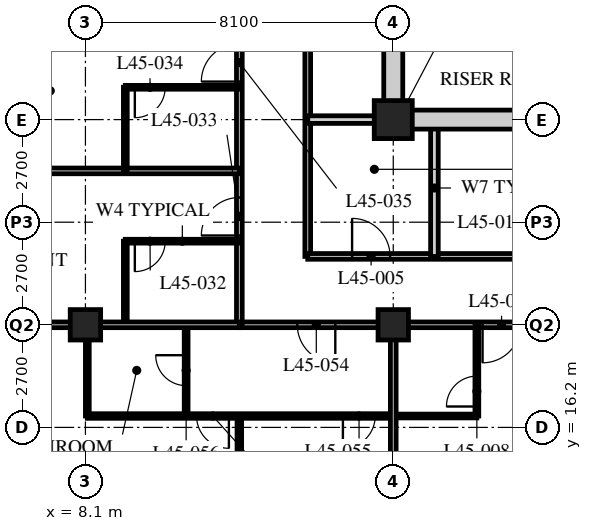
"""IFC4 building model, lengths in metres.
Left out: names, types, materials, properties, quantities, classifications, styles, units other than length and angle.
Written with IfcOpenShell. Run it as: python <this file> out.ifc"""

import sys

from ifc_helpers import new_model, si_unit, direction, frame, frame_2d, origin, origin_2d, place, context, subcontext, project, spatial, rectangle, hollow_rectangle, extrude, element, fill, save


model = new_model("IFC4")
c1 = context("Model", 3, precision=1e-05, world=origin(), true_north=direction((0.0, 1.0)))
c2 = subcontext(c1, "Body", "Model", "MODEL_VIEW")
j1 = project(units=[si_unit("LENGTHUNIT", "METRE"), si_unit("PLANEANGLEUNIT", "RADIAN")], contexts=[c1])
p1 = place(None, origin())
s1 = spatial("IfcSite", under=j1, at=p1, CompositionType="ELEMENT")
p2 = place(p1, origin())
s2 = spatial("IfcBuilding", under=s1, at=p2, CompositionType="ELEMENT")
p3 = place(p2, frame((0.0, 0.0, 177.6)))
s3 = spatial("IfcBuildingStorey", under=s2, at=p3, CompositionType="ELEMENT", Elevation=177.6)
for number, where, z_axis, x_axis in (
    (1, (8.1, 18.9, 0.0), (0.0, 0.0, 1.0), (1.0, 0.0, 0.0)),
    (2, (16.2, 18.9, 0.0), (0.0, 0.0, 1.0), (1.0, 0.0, 0.0)),
):
    element("IfcColumn", number, at=place(p3, frame(where, z_axis=z_axis, x_axis=x_axis)), inside=s3, PredefinedType="COLUMN", context=c2, shape_type="SweptSolid", body=[
        extrude(hollow_rectangle(XDim=0.8, YDim=0.8, WallThickness=0.08, at=origin_2d()), origin(), (0.0, 0.0, 1.0), 3.6),
    ])
p4 = place(p3, frame((16.2, 24.3, 0.0), z_axis=(0.0, 0.0, 1.0), x_axis=(1.0, 0.0, 0.0)))
e3 = element("IfcColumn", 3, at=p4, inside=s3, PredefinedType="COLUMN", context=c2, shape_type="SweptSolid", body=[
    extrude(hollow_rectangle(XDim=1.0, YDim=1.0, WallThickness=0.1, at=origin_2d()), origin(), (0.0, 0.0, 1.0), 3.6),
])
p5 = place(p3, frame((12.15, 18.9, 0.0), z_axis=(0.0, 0.0, 1.0), x_axis=(1.0, 0.0, 0.0)))
e4 = element("IfcWall", 4, at=p5, inside=s3, PredefinedType="PARTITIONING", context=c2, shape_type="SweptSolid", body=[
    extrude(rectangle(XDim=32.4, YDim=0.15, at=frame_2d((16.2, 0.0))), origin(), (0.0, 0.0, 1.0), 2.778),
])
p6 = place(p5, frame((6.4, 0.0, 0.0)))
e5 = element("IfcOpeningElement", 5, at=p6, cuts=e4, PredefinedType="OPENING", context=c2, shape_type="SweptSolid", body=[
    extrude(rectangle(XDim=1.0, YDim=2.1, at=frame_2d((0.5, 1.05))), frame((0.0, 0.085, 0.0), z_axis=(0.0, -1.0, 0.0), x_axis=(1.0, 0.0, 0.0)), (0.0, 0.0, 1.0), 0.17),
])
p7 = place(p5, frame((8.8, 0.0, 0.0)))
e6 = element("IfcOpeningElement", 6, at=p7, cuts=e4, PredefinedType="OPENING", context=c2, shape_type="SweptSolid", body=[
    extrude(rectangle(XDim=1.0, YDim=2.1, at=frame_2d((0.5, 1.05))), frame((0.0, 0.085, 0.0), z_axis=(0.0, -1.0, 0.0), x_axis=(1.0, 0.0, 0.0)), (0.0, 0.0, 1.0), 0.17),
])
p8 = place(p5, frame((13.05, 0.0, 0.0)))
e7 = element("IfcOpeningElement", 7, at=p8, cuts=e4, PredefinedType="OPENING", context=c2, shape_type="SweptSolid", body=[
    extrude(rectangle(XDim=1.0, YDim=2.1, at=frame_2d((0.5, 1.05))), frame((0.0, 0.085, 0.0), z_axis=(0.0, -1.0, 0.0), x_axis=(1.0, 0.0, 0.0)), (0.0, 0.0, 1.0), 0.17),
])
p9 = place(p5, frame((22.6, 0.0, 0.0)))
e8 = element("IfcOpeningElement", 8, at=p9, cuts=e4, PredefinedType="OPENING", context=c2, shape_type="SweptSolid", body=[
    extrude(rectangle(XDim=1.0, YDim=2.1, at=frame_2d((0.5, 1.05))), frame((0.0, 0.085, 0.0), z_axis=(0.0, -1.0, 0.0), x_axis=(1.0, 0.0, 0.0)), (0.0, 0.0, 1.0), 0.17),
])
p10 = place(p5, frame((25.0, 0.0, 0.0)))
e9 = element("IfcOpeningElement", 9, at=p10, cuts=e4, PredefinedType="OPENING", context=c2, shape_type="SweptSolid", body=[
    extrude(rectangle(XDim=1.0, YDim=2.1, at=frame_2d((0.5, 1.05))), frame((0.0, 0.085, 0.0), z_axis=(0.0, -1.0, 0.0), x_axis=(1.0, 0.0, 0.0)), (0.0, 0.0, 1.0), 0.17),
])
p11 = place(p5, frame((1.525, 0.0, 0.0)))
e10 = element("IfcOpeningElement", 10, at=p11, cuts=e4, PredefinedType="OPENING", context=c2, shape_type="SweptSolid", body=[
    extrude(rectangle(XDim=1.0, YDim=2.1, at=frame_2d((0.5, 1.05))), frame((0.0, 0.085, 0.0), z_axis=(0.0, -1.0, 0.0), x_axis=(1.0, 0.0, 0.0)), (0.0, 0.0, 1.0), 0.17),
])
p12 = place(p5, frame((29.875, 0.0, 0.0)))
e11 = element("IfcOpeningElement", 11, at=p12, cuts=e4, PredefinedType="OPENING", context=c2, shape_type="SweptSolid", body=[
    extrude(rectangle(XDim=1.0, YDim=2.1, at=frame_2d((0.5, 1.05))), frame((0.0, 0.085, 0.0), z_axis=(0.0, -1.0, 0.0), x_axis=(1.0, 0.0, 0.0)), (0.0, 0.0, 1.0), 0.17),
])
p13 = place(p3, frame((12.15, 18.9, 0.0), z_axis=(0.0, 0.0, 1.0), x_axis=(0.0, 1.0, 0.0)))
e12 = element("IfcWall", 12, at=p13, inside=s3, PredefinedType="PARTITIONING", context=c2, shape_type="SweptSolid", body=[
    extrude(rectangle(XDim=24.3, YDim=0.15, at=frame_2d((12.15, 0.0))), origin(), (0.0, 0.0, 1.0), 3.39),
])
p14 = place(p13, frame((2.35, 0.0, 0.0)))
e13 = element("IfcOpeningElement", 13, at=p14, cuts=e12, PredefinedType="OPENING", context=c2, shape_type="SweptSolid", body=[
    extrude(rectangle(XDim=1.0, YDim=2.1, at=frame_2d((0.5, 1.05))), frame((0.0, 0.085, 0.0), z_axis=(0.0, -1.0, 0.0), x_axis=(1.0, 0.0, 0.0)), (0.0, 0.0, 1.0), 0.17),
])
p15 = place(p13, frame((6.4, 0.0, 0.0)))
e14 = element("IfcOpeningElement", 14, at=p15, cuts=e12, PredefinedType="OPENING", context=c2, shape_type="SweptSolid", body=[
    extrude(rectangle(XDim=1.0, YDim=2.1, at=frame_2d((0.5, 1.05))), frame((0.0, 0.085, 0.0), z_axis=(0.0, -1.0, 0.0), x_axis=(1.0, 0.0, 0.0)), (0.0, 0.0, 1.0), 0.17),
])
p16 = place(p13, frame((8.5, 0.0, 0.0)))
e15 = element("IfcOpeningElement", 15, at=p16, cuts=e12, PredefinedType="OPENING", context=c2, shape_type="SweptSolid", body=[
    extrude(rectangle(XDim=1.0, YDim=2.1, at=frame_2d((0.5, 1.05))), frame((0.0, 0.085, 0.0), z_axis=(0.0, -1.0, 0.0), x_axis=(1.0, 0.0, 0.0)), (0.0, 0.0, 1.0), 0.17),
])
p17 = place(p13, frame((16.6, 0.0, 0.0)))
e16 = element("IfcOpeningElement", 16, at=p17, cuts=e12, PredefinedType="OPENING", context=c2, shape_type="SweptSolid", body=[
    extrude(rectangle(XDim=1.0, YDim=2.1, at=frame_2d((0.5, 1.05))), frame((0.0, 0.085, 0.0), z_axis=(0.0, -1.0, 0.0), x_axis=(1.0, 0.0, 0.0)), (0.0, 0.0, 1.0), 0.17),
])
p18 = place(p3, frame((13.95, 40.5, 0.0), z_axis=(0.0, 0.0, 1.0), x_axis=(0.0, -1.0, 0.0)))
e17 = element("IfcWall", 17, at=p18, inside=s3, PredefinedType="PARTITIONING", context=c2, shape_type="SweptSolid", body=[
    extrude(rectangle(XDim=19.8, YDim=0.15, at=frame_2d((9.9, 0.0))), origin(), (0.0, 0.0, 1.0), 3.39),
])
p19 = place(p18, frame((11.65, 0.0, 0.0)))
e18 = element("IfcOpeningElement", 18, at=p19, cuts=e17, PredefinedType="OPENING", context=c2, shape_type="SweptSolid", body=[
    extrude(rectangle(XDim=1.0, YDim=2.1, at=frame_2d((0.5, 1.05))), frame((0.0, 0.085, 0.0), z_axis=(0.0, -1.0, 0.0), x_axis=(1.0, 0.0, 0.0)), (0.0, 0.0, 1.0), 0.17),
])
p20 = place(p18, frame((3.55, 0.0, 0.0)))
e19 = element("IfcOpeningElement", 19, at=p20, cuts=e17, PredefinedType="OPENING", context=c2, shape_type="SweptSolid", body=[
    extrude(rectangle(XDim=1.0, YDim=2.1, at=frame_2d((0.5, 1.05))), frame((0.0, 0.085, 0.0), z_axis=(0.0, -1.0, 0.0), x_axis=(1.0, 0.0, 0.0)), (0.0, 0.0, 1.0), 0.17),
])
p21 = place(p3, frame((13.95, 20.7, 0.0), z_axis=(0.0, 0.0, 1.0), x_axis=(1.0, 0.0, 0.0)))
e20 = element("IfcWall", 20, at=p21, inside=s3, PredefinedType="PARTITIONING", context=c2, shape_type="SweptSolid", body=[
    extrude(rectangle(XDim=13.19, YDim=0.15, at=frame_2d((6.595, 0.0))), origin(), (0.0, 0.0, 1.0), 3.39),
])
p22 = place(p21, frame((1.167, 0.0, 0.0)))
e21 = element("IfcOpeningElement", 21, at=p22, cuts=e20, PredefinedType="OPENING", context=c2, shape_type="SweptSolid", body=[
    extrude(rectangle(XDim=1.0, YDim=2.1, at=frame_2d((0.5, 1.05))), frame((0.0, 0.085, 0.0), z_axis=(0.0, -1.0, 0.0), x_axis=(1.0, 0.0, 0.0)), (0.0, 0.0, 1.0), 0.17),
])
p23 = place(p21, frame((7.767, 0.0, 0.0)))
e22 = element("IfcOpeningElement", 22, at=p23, cuts=e20, PredefinedType="OPENING", context=c2, shape_type="SweptSolid", body=[
    extrude(rectangle(XDim=1.0, YDim=2.1, at=frame_2d((0.5, 1.05))), frame((0.0, 0.085, 0.0), z_axis=(0.0, -1.0, 0.0), x_axis=(1.0, 0.0, 0.0)), (0.0, 0.0, 1.0), 0.17),
])
p24 = place(p3, frame((17.283, 20.7, 0.0), z_axis=(0.0, 0.0, 1.0), x_axis=(0.0, 1.0, 0.0)))
e23 = element("IfcWall", 23, at=p24, inside=s3, PredefinedType="SOLIDWALL", context=c2, shape_type="SweptSolid", body=[
    extrude(rectangle(XDim=3.6, YDim=0.2, at=frame_2d((1.8, 0.0))), origin(), (0.0, 0.0, 1.0), 3.39),
])
p25 = place(p3, frame((13.95, 24.3, 0.0), z_axis=(0.0, 0.0, 1.0), x_axis=(1.0, 0.0, 0.0)))
e24 = element("IfcWall", 24, at=p25, inside=s3, PredefinedType="SOLIDWALL", context=c2, shape_type="SweptSolid", body=[
    extrude(rectangle(XDim=2.25, YDim=0.2, at=frame_2d((1.125, 0.0))), origin(), (0.0, 0.0, 1.0), 3.39),
])
p26 = place(p3, frame((16.2, 16.5, 0.0), z_axis=(0.0, 0.0, 1.0), x_axis=(1.0, 0.0, 0.0)))
e25 = element("IfcWall", 25, at=p26, inside=s3, PredefinedType="PARTITIONING", context=c2, shape_type="SweptSolid", body=[
    extrude(rectangle(XDim=2.2, YDim=0.1, at=frame_2d((1.1, 0.0))), origin(), (0.0, 0.0, 1.0), 3.39),
])
p27 = place(p3, frame((18.4, 18.9, 0.0), z_axis=(0.0, 0.0, 1.0), x_axis=(0.0, -1.0, 0.0)))
e26 = element("IfcWall", 26, at=p27, inside=s3, PredefinedType="PARTITIONING", context=c2, shape_type="SweptSolid", body=[
    extrude(rectangle(XDim=2.4, YDim=0.1, at=frame_2d((1.2, 0.0))), origin(), (0.0, 0.0, 1.0), 3.39),
])
p28 = place(p27, frame((1.35, 0.0, 0.0)))
e27 = element("IfcOpeningElement", 27, at=p28, cuts=e26, PredefinedType="OPENING", context=c2, shape_type="SweptSolid", body=[
    extrude(rectangle(XDim=0.8, YDim=2.1, at=frame_2d((0.4, 1.05))), frame((0.0, 0.06, 0.0), z_axis=(0.0, -1.0, 0.0), x_axis=(1.0, 0.0, 0.0)), (0.0, 0.0, 1.0), 0.12),
])
p29 = place(p3, frame((9.15, 18.9, 0.0), z_axis=(0.0, 0.0, 1.0), x_axis=(0.0, 1.0, 0.0)))
e28 = element("IfcWall", 28, at=p29, inside=s3, PredefinedType="PARTITIONING", context=c2, shape_type="SweptSolid", body=[
    extrude(rectangle(XDim=2.2, YDim=0.1, at=frame_2d((1.1, 0.0))), origin(), (0.0, 0.0, 1.0), 3.39),
])
p30 = place(p3, frame((12.15, 21.1, 0.0), z_axis=(0.0, 0.0, 1.0), x_axis=(-1.0, 0.0, 0.0)))
e29 = element("IfcWall", 29, at=p30, inside=s3, PredefinedType="PARTITIONING", context=c2, shape_type="SweptSolid", body=[
    extrude(rectangle(XDim=3.0, YDim=0.1, at=frame_2d((1.5, 0.0))), origin(), (0.0, 0.0, 1.0), 3.39),
])
p31 = place(p30, frame((1.95, 0.0, 0.0)))
e30 = element("IfcOpeningElement", 30, at=p31, cuts=e29, PredefinedType="OPENING", context=c2, shape_type="SweptSolid", body=[
    extrude(rectangle(XDim=0.8, YDim=2.1, at=frame_2d((0.4, 1.05))), frame((0.0, 0.06, 0.0), z_axis=(0.0, -1.0, 0.0), x_axis=(1.0, 0.0, 0.0)), (0.0, 0.0, 1.0), 0.12),
])
p32 = place(p3, frame((12.15, 22.95, 0.0), z_axis=(0.0, 0.0, 1.0), x_axis=(-1.0, 0.0, 0.0)))
e31 = element("IfcWall", 31, at=p32, inside=s3, PredefinedType="PARTITIONING", context=c2, shape_type="SweptSolid", body=[
    extrude(rectangle(XDim=11.85, YDim=0.15, at=frame_2d((5.925, 0.0))), origin(), (0.0, 0.0, 1.0), 3.39),
])
p33 = place(p3, frame((9.15, 22.95, 0.0), z_axis=(0.0, 0.0, 1.0), x_axis=(0.0, 1.0, 0.0)))
e32 = element("IfcWall", 32, at=p33, inside=s3, PredefinedType="PARTITIONING", context=c2, shape_type="SweptSolid", body=[
    extrude(rectangle(XDim=2.2, YDim=0.1, at=frame_2d((1.1, 0.0))), origin(), (0.0, 0.0, 1.0), 3.39),
])
p34 = place(p3, frame((12.15, 25.15, 0.0), z_axis=(0.0, 0.0, 1.0), x_axis=(-1.0, 0.0, 0.0)))
e33 = element("IfcWall", 33, at=p34, inside=s3, PredefinedType="PARTITIONING", context=c2, shape_type="SweptSolid", body=[
    extrude(rectangle(XDim=3.0, YDim=0.1, at=frame_2d((1.5, 0.0))), origin(), (0.0, 0.0, 1.0), 3.39),
])
p35 = place(p34, frame((1.95, 0.0, 0.0)))
e34 = element("IfcOpeningElement", 34, at=p35, cuts=e33, PredefinedType="OPENING", context=c2, shape_type="SweptSolid", body=[
    extrude(rectangle(XDim=0.8, YDim=2.1, at=frame_2d((0.4, 1.05))), frame((0.0, 0.06, 0.0), z_axis=(0.0, -1.0, 0.0), x_axis=(1.0, 0.0, 0.0)), (0.0, 0.0, 1.0), 0.12),
])
p36 = place(p3, frame((10.75, 18.9, 0.0), z_axis=(0.0, 0.0, 1.0), x_axis=(0.0, -1.0, 0.0)))
e35 = element("IfcWall", 35, at=p36, inside=s3, PredefinedType="PARTITIONING", context=c2, shape_type="SweptSolid", body=[
    extrude(rectangle(XDim=2.4, YDim=0.1, at=frame_2d((1.2, 0.0))), origin(), (0.0, 0.0, 1.0), 3.39),
])
p37 = place(p36, frame((0.8, 0.0, 0.0)))
e36 = element("IfcOpeningElement", 36, at=p37, cuts=e35, PredefinedType="OPENING", context=c2, shape_type="SweptSolid", body=[
    extrude(rectangle(XDim=0.8, YDim=2.1, at=frame_2d((0.4, 1.05))), frame((0.0, 0.06, 0.0), z_axis=(0.0, -1.0, 0.0), x_axis=(1.0, 0.0, 0.0)), (0.0, 0.0, 1.0), 0.12),
])
p38 = place(p3, frame((8.15, 18.9, 0.0), z_axis=(0.0, 0.0, 1.0), x_axis=(0.0, -1.0, 0.0)))
e37 = element("IfcWall", 37, at=p38, inside=s3, PredefinedType="PARTITIONING", context=c2, shape_type="SweptSolid", body=[
    extrude(rectangle(XDim=2.4, YDim=0.1, at=frame_2d((1.2, 0.0))), origin(), (0.0, 0.0, 1.0), 2.778),
])
p39 = place(p3, frame((8.15, 16.5, 0.0), z_axis=(0.0, 0.0, 1.0), x_axis=(1.0, 0.0, 0.0)))
e38 = element("IfcWall", 38, at=p39, inside=s3, PredefinedType="PARTITIONING", context=c2, shape_type="SweptSolid", body=[
    extrude(rectangle(XDim=8.05, YDim=0.12, at=frame_2d((4.025, 0.0))), origin(), (0.0, 0.0, 1.0), 3.39),
])
p40 = place(p39, frame((6.725, 0.0, 0.0)))
e39 = element("IfcOpeningElement", 39, at=p40, cuts=e38, PredefinedType="OPENING", context=c2, shape_type="SweptSolid", body=[
    extrude(rectangle(XDim=0.85, YDim=2.1, at=frame_2d((0.425, 1.05))), frame((0.0, 0.07, 0.0), z_axis=(0.0, -1.0, 0.0), x_axis=(1.0, 0.0, 0.0)), (0.0, 0.0, 1.0), 0.14),
])
p41 = place(p39, frame((2.875, 0.0, 0.0)))
e40 = element("IfcOpeningElement", 40, at=p41, cuts=e38, PredefinedType="OPENING", context=c2, shape_type="SweptSolid", body=[
    extrude(rectangle(XDim=0.85, YDim=2.1, at=frame_2d((0.425, 1.05))), frame((0.0, 0.07, 0.0), z_axis=(0.0, -1.0, 0.0), x_axis=(1.0, 0.0, 0.0)), (0.0, 0.0, 1.0), 0.14),
])
p42 = place(p3, frame((12.15, 16.5, 0.0), z_axis=(0.0, 0.0, 1.0), x_axis=(0.0, -1.0, 0.0)))
e41 = element("IfcWall", 41, at=p42, inside=s3, PredefinedType="PARTITIONING", context=c2, shape_type="SweptSolid", body=[
    extrude(rectangle(XDim=5.4, YDim=0.12, at=frame_2d((2.7, 0.0))), origin(), (0.0, 0.0, 1.0), 3.39),
])
for number, where, z_axis, x_axis in (
    (42, (4.35, 18.9, 0.0), (0.0, 0.0, 1.0), (1.0, 0.0, 0.0)),
    (43, (16.2, 18.9, 0.0), (0.0, 0.0, 1.0), (0.0, -1.0, 0.0)),
):
    element("IfcWall", number, at=place(p3, frame(where, z_axis=z_axis, x_axis=x_axis)), inside=s3, PredefinedType="PARTITIONING", context=c2, shape_type="SweptSolid", body=[
        extrude(rectangle(XDim=7.8, YDim=0.15, at=frame_2d((3.9, 0.0))), origin(), (0.0, 0.0, 1.0), 2.778),
    ])
p43 = place(p3, frame((15.95, 24.3, 0.0), z_axis=(0.0, 0.0, 1.0), x_axis=(1.0, 0.0, 0.0)))
e44 = element("IfcWall", 44, at=p43, inside=s3, PredefinedType="SOLIDWALL", context=c2, shape_type="SweptSolid", body=[
    extrude(rectangle(XDim=24.8, YDim=0.5, at=frame_2d((12.4, 0.0))), origin(), (0.0, 0.0, 1.0), 2.74),
])
p44 = place(p43, frame((11.5, 0.0, 0.0)))
e45 = element("IfcOpeningElement", 45, at=p44, cuts=e44, PredefinedType="OPENING", context=c2, shape_type="SweptSolid", body=[
    extrude(rectangle(XDim=1.8, YDim=2.4, at=frame_2d((0.9, 1.2))), frame((0.0, 0.26, 0.0), z_axis=(0.0, -1.0, 0.0), x_axis=(1.0, 0.0, 0.0)), (0.0, 0.0, 1.0), 0.52),
])
p45 = place(p3, frame((16.2, 24.55, 0.0), z_axis=(0.0, 0.0, 1.0), x_axis=(0.0, 1.0, 0.0)))
e46 = element("IfcWall", 46, at=p45, inside=s3, PredefinedType="SOLIDWALL", context=c2, shape_type="SweptSolid", body=[
    extrude(rectangle(XDim=15.7, YDim=0.5, at=frame_2d((7.85, 0.0))), origin(), (0.0, 0.0, 1.0), 2.778),
])
p46 = place(p22, origin())
e47 = element("IfcDoor", 47, at=p46, inside=s3, OperationType="SINGLE_SWING_LEFT", PredefinedType="DOOR", context=c2, shape_type="SweptSolid", body=[
    extrude(rectangle(XDim=1.0, YDim=2.1, at=frame_2d((0.5, 1.05))), frame((0.0, 0.025, 0.0), z_axis=(0.0, -1.0, 0.0), x_axis=(1.0, 0.0, 0.0)), (0.0, 0.0, 1.0), 0.05),
])
fill(e21, e47)
p47 = place(p28, origin())
e48 = element("IfcDoor", 48, at=p47, inside=s3, OperationType="SINGLE_SWING_LEFT", PredefinedType="DOOR", context=c2, shape_type="SweptSolid", body=[
    extrude(rectangle(XDim=0.8, YDim=2.1, at=frame_2d((0.4, 1.05))), frame((0.0, 0.025, 0.0), z_axis=(0.0, -1.0, 0.0), x_axis=(1.0, 0.0, 0.0)), (0.0, 0.0, 1.0), 0.05),
])
fill(e27, e48)
p48 = place(p6, origin())
e49 = element("IfcDoor", 49, at=p48, inside=s3, OperationType="SINGLE_SWING_RIGHT", PredefinedType="DOOR", context=c2, shape_type="SweptSolid", body=[
    extrude(rectangle(XDim=1.0, YDim=2.1, at=frame_2d((0.5, 1.05))), frame((0.0, 0.025, 0.0), z_axis=(0.0, -1.0, 0.0), x_axis=(1.0, 0.0, 0.0)), (0.0, 0.0, 1.0), 0.05),
])
fill(e5, e49)
p49 = place(p31, origin())
e50 = element("IfcDoor", 50, at=p49, inside=s3, OperationType="SINGLE_SWING_RIGHT", PredefinedType="DOOR", context=c2, shape_type="SweptSolid", body=[
    extrude(rectangle(XDim=0.8, YDim=2.1, at=frame_2d((0.4, 1.05))), frame((0.0, 0.025, 0.0), z_axis=(0.0, -1.0, 0.0), x_axis=(1.0, 0.0, 0.0)), (0.0, 0.0, 1.0), 0.05),
])
fill(e30, e50)
p50 = place(p14, origin())
e51 = element("IfcDoor", 51, at=p50, inside=s3, OperationType="SINGLE_SWING_LEFT", PredefinedType="DOOR", context=c2, shape_type="SweptSolid", body=[
    extrude(rectangle(XDim=1.0, YDim=2.1, at=frame_2d((0.5, 1.05))), frame((0.0, 0.025, 0.0), z_axis=(0.0, -1.0, 0.0), x_axis=(1.0, 0.0, 0.0)), (0.0, 0.0, 1.0), 0.05),
])
fill(e13, e51)
p51 = place(p35, origin())
e52 = element("IfcDoor", 52, at=p51, inside=s3, OperationType="SINGLE_SWING_RIGHT", PredefinedType="DOOR", context=c2, shape_type="SweptSolid", body=[
    extrude(rectangle(XDim=0.8, YDim=2.1, at=frame_2d((0.4, 1.05))), frame((0.0, 0.025, 0.0), z_axis=(0.0, -1.0, 0.0), x_axis=(1.0, 0.0, 0.0)), (0.0, 0.0, 1.0), 0.05),
])
fill(e34, e52)
p52 = place(p15, origin())
e53 = element("IfcDoor", 53, at=p52, inside=s3, OperationType="SINGLE_SWING_LEFT", PredefinedType="DOOR", context=c2, shape_type="SweptSolid", body=[
    extrude(rectangle(XDim=1.0, YDim=2.1, at=frame_2d((0.5, 1.05))), frame((0.0, 0.025, 0.0), z_axis=(0.0, -1.0, 0.0), x_axis=(1.0, 0.0, 0.0)), (0.0, 0.0, 1.0), 0.05),
])
fill(e14, e53)
p53 = place(p11, origin())
e54 = element("IfcDoor", 54, at=p53, inside=s3, OperationType="SINGLE_SWING_LEFT", PredefinedType="DOOR", context=c2, shape_type="SweptSolid", body=[
    extrude(rectangle(XDim=1.0, YDim=2.1, at=frame_2d((0.5, 1.05))), frame((0.0, 0.025, 0.0), z_axis=(0.0, -1.0, 0.0), x_axis=(1.0, 0.0, 0.0)), (0.0, 0.0, 1.0), 0.05),
])
fill(e10, e54)
p54 = place(p40, origin())
e55 = element("IfcDoor", 55, at=p54, inside=s3, OperationType="SINGLE_SWING_RIGHT", PredefinedType="DOOR", context=c2, shape_type="SweptSolid", body=[
    extrude(rectangle(XDim=0.85, YDim=2.1, at=frame_2d((0.425, 1.05))), frame((0.0, 0.025, 0.0), z_axis=(0.0, -1.0, 0.0), x_axis=(1.0, 0.0, 0.0)), (0.0, 0.0, 1.0), 0.05),
])
fill(e39, e55)
p55 = place(p37, origin())
e56 = element("IfcDoor", 56, at=p55, inside=s3, OperationType="SINGLE_SWING_RIGHT", PredefinedType="DOOR", context=c2, shape_type="SweptSolid", body=[
    extrude(rectangle(XDim=0.8, YDim=2.1, at=frame_2d((0.4, 1.05))), frame((0.0, 0.025, 0.0), z_axis=(0.0, -1.0, 0.0), x_axis=(1.0, 0.0, 0.0)), (0.0, 0.0, 1.0), 0.05),
])
fill(e36, e56)
p56 = place(p41, origin())
e57 = element("IfcDoor", 57, at=p56, inside=s3, OperationType="SINGLE_SWING_LEFT", PredefinedType="DOOR", context=c2, shape_type="SweptSolid", body=[
    extrude(rectangle(XDim=0.85, YDim=2.1, at=frame_2d((0.425, 1.05))), frame((0.0, 0.025, 0.0), z_axis=(0.0, -1.0, 0.0), x_axis=(1.0, 0.0, 0.0)), (0.0, 0.0, 1.0), 0.05),
])
fill(e40, e57)
save(model, sys.argv[1])
